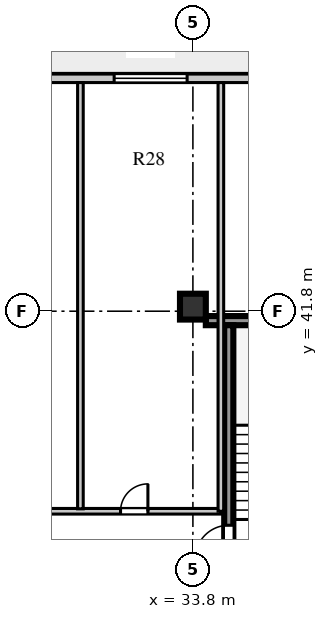
"""IFC4 building model, lengths in metres.
Left out: names, types, materials, properties, quantities, classifications, styles, units other than length and angle.
Written with IfcOpenShell. Run it as: python <this file> out.ifc"""

import sys

from ifc_helpers import new_model, si_unit, direction, frame, frame_2d, origin, origin_2d, place, context, subcontext, project, spatial, rectangle, extrude, element, fill, save


model = new_model("IFC4")
c1 = context("Model", 3, precision=1e-05, world=origin(), true_north=direction((0.0, 1.0)))
c2 = subcontext(c1, "Body", "Model", "MODEL_VIEW")
j1 = project(units=[si_unit("LENGTHUNIT", "METRE"), si_unit("PLANEANGLEUNIT", "RADIAN")], contexts=[c1])
p1 = place(None, origin())
s1 = spatial("IfcSite", under=j1, at=p1, CompositionType="ELEMENT")
p2 = place(p1, origin())
s2 = spatial("IfcBuilding", under=s1, at=p2, CompositionType="ELEMENT")
p3 = place(p2, frame((0.0, 0.0, 260.9)))
s3 = spatial("IfcBuildingStorey", under=s2, at=p3, CompositionType="ELEMENT", Elevation=260.9)
p4 = place(p3, frame((34.225, 41.49, 0.0), z_axis=(0.0, 0.0, 1.0), x_axis=(1.0, 0.0, 0.0)))
e1 = element("IfcWall", 1, at=p4, inside=s3, PredefinedType="SHEAR", context=c2, shape_type="SweptSolid", body=[
    extrude(rectangle(XDim=4.645, YDim=0.3, at=frame_2d((2.323, 0.0))), origin(), (0.0, 0.0, 1.0), 3.66),
])
p5 = place(p3, frame((34.98, 33.31, 0.0), z_axis=(0.0, 0.0, 1.0), x_axis=(0.0, 1.0, 0.0)))
e2 = element("IfcWall", 2, at=p5, inside=s3, PredefinedType="SHEAR", context=c2, shape_type="SweptSolid", body=[
    extrude(rectangle(XDim=8.03, YDim=0.3, at=frame_2d((4.015, 0.0))), origin(), (0.0, 0.0, 1.0), 3.66),
])
p6 = place(p5, frame((0.35, 0.0, 0.0)))
e3 = element("IfcOpeningElement", 3, at=p6, cuts=e2, PredefinedType="OPENING", context=c2, shape_type="SweptSolid", body=[
    extrude(rectangle(XDim=1.1, YDim=2.1, at=frame_2d((0.55, 1.05))), frame((0.0, 0.16, 0.0), z_axis=(0.0, -1.0, 0.0), x_axis=(1.0, 0.0, 0.0)), (0.0, 0.0, 1.0), 0.32),
])
p7 = place(p3, frame((33.8, 41.95, 0.0), z_axis=(0.0, 0.0, 1.0), x_axis=(1.0, 0.0, 0.0)))
e4 = element("IfcColumn", 4, at=p7, inside=s3, PredefinedType="COLUMN", context=c2, shape_type="SweptSolid", body=[
    extrude(rectangle(XDim=0.85, YDim=0.85, at=origin_2d()), origin(), (0.0, 0.0, 1.0), 3.66),
])
p8 = place(p3, frame((45.55, 49.46, 0.0), z_axis=(0.0, 0.0, 1.0), x_axis=(-1.0, 0.0, 0.0)))
e5 = element("IfcWall", 5, at=p8, inside=s3, PredefinedType="STANDARD", context=c2, shape_type="SweptSolid", body=[
    extrude(rectangle(XDim=32.5, YDim=0.28, at=frame_2d((16.25, 0.0))), origin(), (0.0, 0.0, 1.0), 3.66),
])
p9 = place(p8, frame((30.55, 0.0, 0.0)))
e6 = element("IfcOpeningElement", 6, at=p9, cuts=e5, PredefinedType="OPENING", context=c2, shape_type="SweptSolid", body=[
    extrude(rectangle(XDim=1.0, YDim=2.05, at=frame_2d((0.5, 1.025))), frame((0.0, 0.15, 0.0), z_axis=(0.0, -1.0, 0.0), x_axis=(1.0, 0.0, 0.0)), (0.0, 0.0, 1.0), 0.3),
])
p10 = place(p8, frame((24.715, 0.0, 0.8)))
e7 = element("IfcOpeningElement", 7, at=p10, cuts=e5, PredefinedType="OPENING", context=c2, shape_type="SweptSolid", body=[
    extrude(rectangle(XDim=1.5, YDim=2.0, at=frame_2d((0.75, 1.0))), frame((0.0, 0.15, 0.0), z_axis=(0.0, -1.0, 0.0), x_axis=(1.0, 0.0, 0.0)), (0.0, 0.0, 1.0), 0.3),
])
p11 = place(p8, frame((17.29, 0.0, 0.8)))
e8 = element("IfcOpeningElement", 8, at=p11, cuts=e5, PredefinedType="OPENING", context=c2, shape_type="SweptSolid", body=[
    extrude(rectangle(XDim=1.2, YDim=1.75, at=frame_2d((0.6, 0.875))), frame((0.0, 0.15, 0.0), z_axis=(0.0, -1.0, 0.0), x_axis=(1.0, 0.0, 0.0)), (0.0, 0.0, 1.0), 0.3),
])
p12 = place(p8, frame((11.94, 0.0, 0.8)))
e9 = element("IfcOpeningElement", 9, at=p12, cuts=e5, PredefinedType="OPENING", context=c2, shape_type="SweptSolid", body=[
    extrude(rectangle(XDim=2.4, YDim=2.05, at=frame_2d((1.2, 1.025))), frame((0.0, 0.15, 0.0), z_axis=(0.0, -1.0, 0.0), x_axis=(1.0, 0.0, 0.0)), (0.0, 0.0, 1.0), 0.3),
])
p13 = place(p8, frame((4.42, 0.0, 0.8)))
e10 = element("IfcOpeningElement", 10, at=p13, cuts=e5, PredefinedType="OPENING", context=c2, shape_type="SweptSolid", body=[
    extrude(rectangle(XDim=2.1, YDim=1.95, at=frame_2d((1.05, 0.975))), frame((0.0, 0.15, 0.0), z_axis=(0.0, -1.0, 0.0), x_axis=(1.0, 0.0, 0.0)), (0.0, 0.0, 1.0), 0.3),
])
p14 = place(p3, frame((25.22, 35.22, 0.0), z_axis=(0.0, 0.0, 1.0), x_axis=(1.0, 0.0, 0.0)))
e11 = element("IfcWall", 11, at=p14, inside=s3, PredefinedType="SOLIDWALL", context=c2, shape_type="SweptSolid", body=[
    extrude(rectangle(XDim=9.5, YDim=0.185, at=frame_2d((4.75, 0.0))), origin(), (0.0, 0.0, 1.0), 3.66),
])
p15 = place(p14, frame((1.2, 0.0, 0.0)))
e12 = element("IfcOpeningElement", 12, at=p15, cuts=e11, PredefinedType="OPENING", context=c2, shape_type="SweptSolid", body=[
    extrude(rectangle(XDim=1.0, YDim=2.08, at=frame_2d((0.5, 1.04))), frame((0.0, 0.103, 0.0), z_axis=(0.0, -1.0, 0.0), x_axis=(1.0, 0.0, 0.0)), (0.0, 0.0, 1.0), 0.205),
])
p16 = place(p14, frame((6.2, 0.0, 0.0)))
e13 = element("IfcOpeningElement", 13, at=p16, cuts=e11, PredefinedType="OPENING", context=c2, shape_type="SweptSolid", body=[
    extrude(rectangle(XDim=0.9, YDim=2.08, at=frame_2d((0.45, 1.04))), frame((0.0, 0.103, 0.0), z_axis=(0.0, -1.0, 0.0), x_axis=(1.0, 0.0, 0.0)), (0.0, 0.0, 1.0), 0.205),
])
p17 = place(p3, frame((34.72, 35.22, 0.0), z_axis=(0.0, 0.0, 1.0), x_axis=(0.0, 1.0, 0.0)))
e14 = element("IfcWall", 14, at=p17, inside=s3, PredefinedType="SOLIDWALL", context=c2, shape_type="SweptSolid", body=[
    extrude(rectangle(XDim=14.1, YDim=0.185, at=frame_2d((7.05, 0.0))), origin(), (0.0, 0.0, 1.0), 3.66),
])
p18 = place(p3, frame((30.1, 35.3, 0.0), z_axis=(0.0, 0.0, 1.0), x_axis=(0.0, 1.0, 0.0)))
e15 = element("IfcWall", 15, at=p18, inside=s3, PredefinedType="SOLIDWALL", context=c2, shape_type="SweptSolid", body=[
    extrude(rectangle(XDim=14.02, YDim=0.185, at=frame_2d((7.01, 0.0))), origin(), (0.0, 0.0, 1.0), 3.66),
])
p19 = place(p12, origin())
e16 = element("IfcWindow", 16, at=p19, inside=s3, PartitioningType="SINGLE_PANEL", PredefinedType="WINDOW", context=c2, shape_type="SweptSolid", body=[
    extrude(rectangle(XDim=2.4, YDim=2.05, at=frame_2d((1.2, 1.025))), frame((0.0, 0.03, 0.0), z_axis=(0.0, -1.0, 0.0), x_axis=(1.0, 0.0, 0.0)), (0.0, 0.0, 1.0), 0.06),
])
fill(e9, e16)
p20 = place(p6, origin())
e17 = element("IfcDoor", 17, at=p20, inside=s3, OperationType="SINGLE_SWING_LEFT", PredefinedType="DOOR", context=c2, shape_type="SweptSolid", body=[
    extrude(rectangle(XDim=1.1, YDim=2.1, at=frame_2d((0.55, 1.05))), frame((0.0, 0.025, 0.0), z_axis=(0.0, -1.0, 0.0), x_axis=(1.0, 0.0, 0.0)), (0.0, 0.0, 1.0), 0.05),
])
fill(e3, e17)
p21 = place(p16, origin())
e18 = element("IfcDoor", 18, at=p21, inside=s3, OperationType="SINGLE_SWING_RIGHT", PredefinedType="DOOR", context=c2, shape_type="SweptSolid", body=[
    extrude(rectangle(XDim=0.9, YDim=2.08, at=frame_2d((0.45, 1.04))), frame((0.0, 0.025, 0.0), z_axis=(0.0, -1.0, 0.0), x_axis=(1.0, 0.0, 0.0)), (0.0, 0.0, 1.0), 0.05),
])
fill(e13, e18)
save(model, sys.argv[1])
